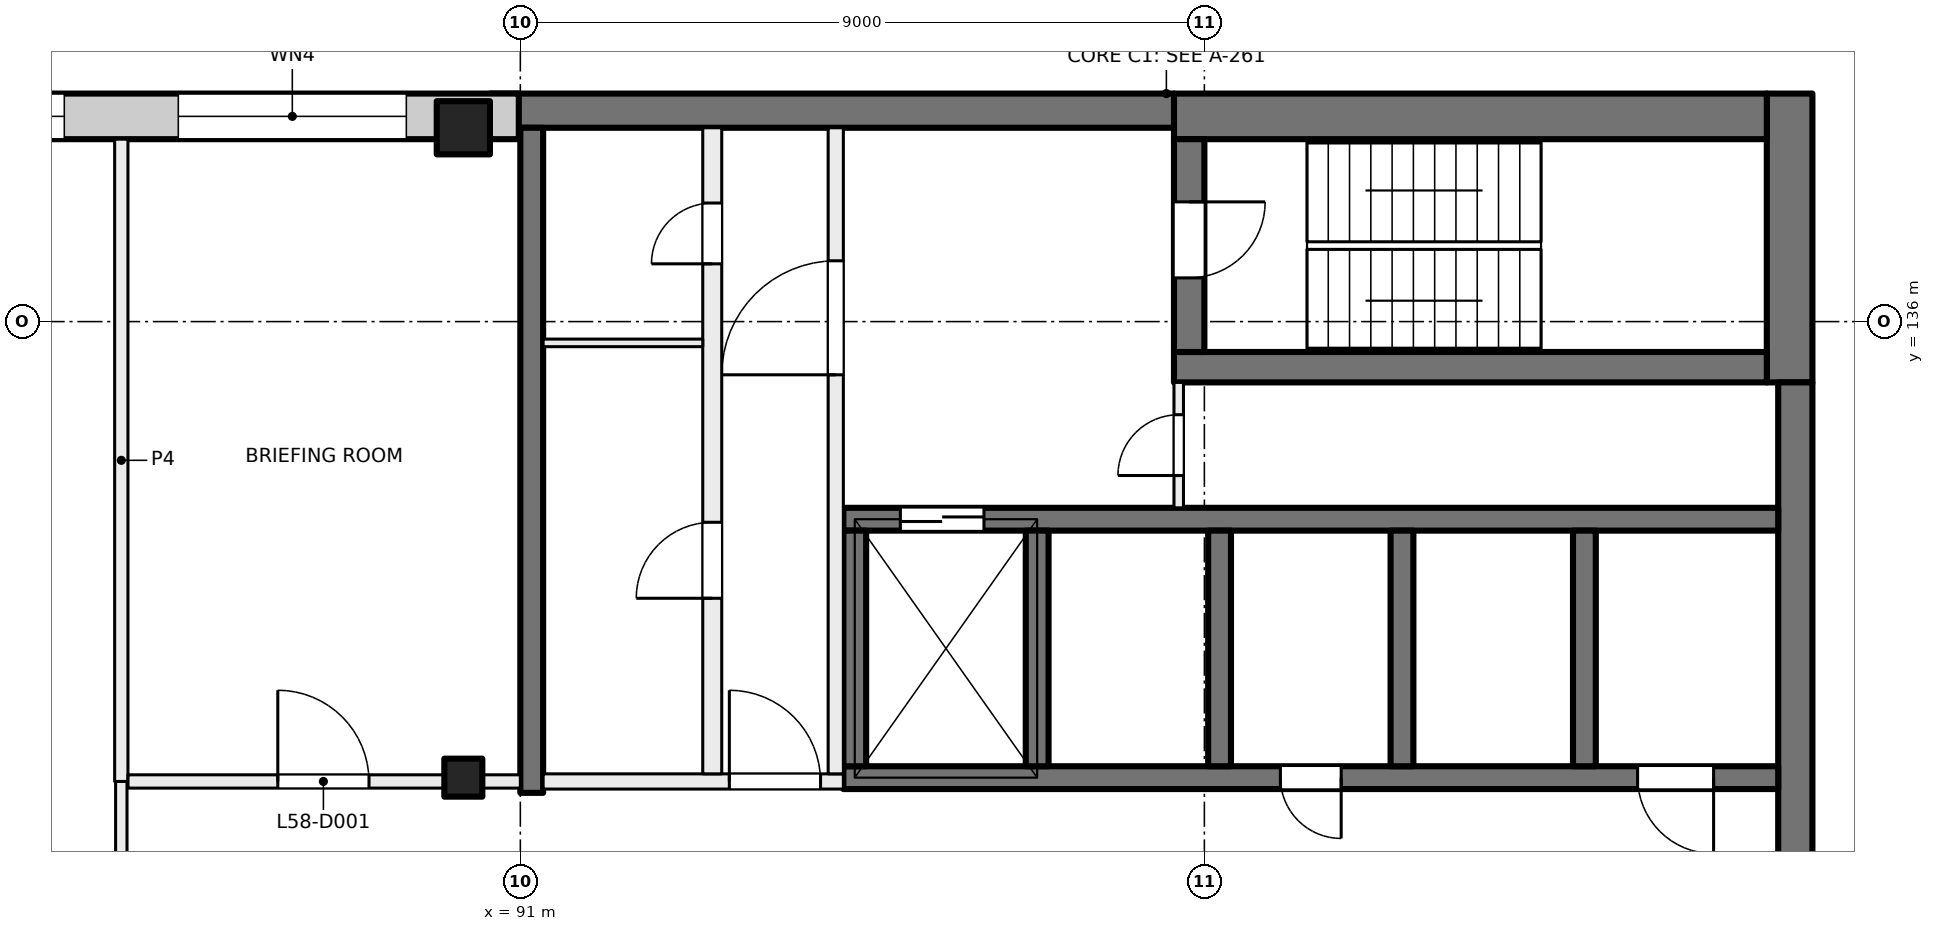
"""IFC4 building model, lengths in metres.
Left out: names, types, materials, properties, quantities, classifications, styles, units other than length and angle.
Written with IfcOpenShell. Run it as: python <this file> out.ifc"""

import sys

from ifc_helpers import new_model, si_unit, direction, frame, frame_2d, origin, origin_2d, place, context, subcontext, project, spatial, rectangle, extrude, element, fill, save


model = new_model("IFC4")
c1 = context("Model", 3, precision=1e-05, world=origin(), true_north=direction((0.0, 1.0)))
c2 = subcontext(c1, "Body", "Model", "MODEL_VIEW")
j1 = project(units=[si_unit("LENGTHUNIT", "METRE"), si_unit("PLANEANGLEUNIT", "RADIAN")], contexts=[c1])
p1 = place(None, origin())
s1 = spatial("IfcSite", under=j1, at=p1, CompositionType="ELEMENT")
p2 = place(p1, origin())
s2 = spatial("IfcBuilding", under=s1, at=p2, CompositionType="ELEMENT")
p3 = place(p2, frame((0.0, 0.0, 245.5)))
s3 = spatial("IfcBuildingStorey", under=s2, at=p3, CompositionType="ELEMENT", Elevation=245.5)
p4 = place(p3, frame((90.25, 130.0, 0.0), z_axis=(0.0, 0.0, 1.0), x_axis=(1.0, 0.0, 0.0)))
e1 = element("IfcColumn", 1, at=p4, inside=s3, PredefinedType="COLUMN", context=c2, shape_type="SweptSolid", body=[
    extrude(rectangle(XDim=0.5, YDim=0.5, at=origin_2d()), origin(), (0.0, 0.0, 1.0), 4.0),
])
p5 = place(p3, frame((90.25, 138.55, 0.0), z_axis=(0.0, 0.0, 1.0), x_axis=(1.0, 0.0, 0.0)))
e2 = element("IfcColumn", 2, at=p5, inside=s3, PredefinedType="COLUMN", context=c2, shape_type="SweptSolid", body=[
    extrude(rectangle(XDim=0.7, YDim=0.7, at=origin_2d()), origin(), (0.0, 0.0, 1.0), 4.0),
])
p6 = place(p3, frame((107.7, 139.0, 0.0), z_axis=(0.0, 0.0, 1.0), x_axis=(0.0, -1.0, 0.0)))
e3 = element("IfcWall", 3, at=p6, inside=s3, PredefinedType="SHEAR", context=c2, shape_type="SweptSolid", body=[
    extrude(rectangle(XDim=3.8, YDim=0.6, at=frame_2d((1.9, 0.0))), origin(), (0.0, 0.0, 1.0), 4.0),
])
p7 = place(p3, frame((107.775, 135.2, 0.0), z_axis=(0.0, 0.0, 1.0), x_axis=(0.0, -1.0, 0.0)))
e4 = element("IfcWall", 4, at=p7, inside=s3, PredefinedType="SHEAR", context=c2, shape_type="SweptSolid", body=[
    extrude(rectangle(XDim=14.4, YDim=0.45, at=frame_2d((7.2, 0.0))), origin(), (0.0, 0.0, 1.0), 4.0),
])
p8 = place(p3, frame((107.4, 138.7, 0.0), z_axis=(0.0, 0.0, 1.0), x_axis=(-1.0, 0.0, 0.0)))
e5 = element("IfcWall", 5, at=p8, inside=s3, PredefinedType="SHEAR", context=c2, shape_type="SweptSolid", body=[
    extrude(rectangle(XDim=7.8, YDim=0.6, at=frame_2d((3.9, 0.0))), origin(), (0.0, 0.0, 1.0), 4.0),
])
p9 = place(p3, frame((99.6, 138.775, 0.0), z_axis=(0.0, 0.0, 1.0), x_axis=(-1.0, 0.0, 0.0)))
e6 = element("IfcWall", 6, at=p9, inside=s3, PredefinedType="SHEAR", context=c2, shape_type="SweptSolid", body=[
    extrude(rectangle(XDim=9.0, YDim=0.45, at=frame_2d((4.5, 0.0))), origin(), (0.0, 0.0, 1.0), 4.0),
])
p10 = place(p3, frame((107.4, 135.4, 0.0), z_axis=(0.0, 0.0, 1.0), x_axis=(-1.0, 0.0, 0.0)))
e7 = element("IfcWall", 7, at=p10, inside=s3, PredefinedType="SHEAR", context=c2, shape_type="SweptSolid", body=[
    extrude(rectangle(XDim=7.8, YDim=0.4, at=frame_2d((3.9, 0.0))), origin(), (0.0, 0.0, 1.0), 4.0),
])
p11 = place(p3, frame((99.8, 138.4, 0.0), z_axis=(0.0, 0.0, 1.0), x_axis=(0.0, -1.0, 0.0)))
e8 = element("IfcWall", 8, at=p11, inside=s3, PredefinedType="SHEAR", context=c2, shape_type="SweptSolid", body=[
    extrude(rectangle(XDim=2.8, YDim=0.4, at=frame_2d((1.4, 0.0))), origin(), (0.0, 0.0, 1.0), 4.0),
])
p12 = place(p11, frame((0.825, 0.0, 0.0)))
e9 = element("IfcOpeningElement", 9, at=p12, cuts=e8, PredefinedType="OPENING", context=c2, shape_type="SweptSolid", body=[
    extrude(rectangle(XDim=1.0, YDim=2.1, at=frame_2d((0.5, 1.05))), frame((0.0, 0.21, 0.0), z_axis=(0.0, -1.0, 0.0), x_axis=(1.0, 0.0, 0.0)), (0.0, 0.0, 1.0), 0.42),
])
p13 = place(p3, frame((107.55, 130.0, 0.0), z_axis=(0.0, 0.0, 1.0), x_axis=(-1.0, 0.0, 0.0)))
e10 = element("IfcWall", 10, at=p13, inside=s3, PredefinedType="SHEAR", context=c2, shape_type="SweptSolid", body=[
    extrude(rectangle(XDim=12.3, YDim=0.3, at=frame_2d((6.15, 0.0))), origin(), (0.0, 0.0, 1.0), 4.0),
])
p14 = place(p13, frame((0.85, 0.0, 0.0)))
e11 = element("IfcOpeningElement", 11, at=p14, cuts=e10, PredefinedType="OPENING", context=c2, shape_type="SweptSolid", body=[
    extrude(rectangle(XDim=1.0, YDim=2.1, at=frame_2d((0.5, 1.05))), frame((0.0, 0.16, 0.0), z_axis=(0.0, -1.0, 0.0), x_axis=(1.0, 0.0, 0.0)), (0.0, 0.0, 1.0), 0.32),
])
p15 = place(p13, frame((5.75, 0.0, 0.0)))
e12 = element("IfcOpeningElement", 12, at=p15, cuts=e10, PredefinedType="OPENING", context=c2, shape_type="SweptSolid", body=[
    extrude(rectangle(XDim=0.8, YDim=2.1, at=frame_2d((0.4, 1.05))), frame((0.0, 0.16, 0.0), z_axis=(0.0, -1.0, 0.0), x_axis=(1.0, 0.0, 0.0)), (0.0, 0.0, 1.0), 0.32),
])
p16 = place(p3, frame((107.55, 133.4, 0.0), z_axis=(0.0, 0.0, 1.0), x_axis=(-1.0, 0.0, 0.0)))
e13 = element("IfcWall", 13, at=p16, inside=s3, PredefinedType="SHEAR", context=c2, shape_type="SweptSolid", body=[
    extrude(rectangle(XDim=12.3, YDim=0.3, at=frame_2d((6.15, 0.0))), origin(), (0.0, 0.0, 1.0), 4.0),
])
p17 = place(p16, frame((10.45, 0.0, 0.0)))
e14 = element("IfcOpeningElement", 14, at=p17, cuts=e13, PredefinedType="OPENING", context=c2, shape_type="SweptSolid", body=[
    extrude(rectangle(XDim=1.1, YDim=2.1, at=frame_2d((0.55, 1.05))), frame((0.0, 0.16, 0.0), z_axis=(0.0, -1.0, 0.0), x_axis=(1.0, 0.0, 0.0)), (0.0, 0.0, 1.0), 0.32),
])
for number, where, z_axis, x_axis in (
    (15, (105.0, 133.25, 0.0), (0.0, 0.0, 1.0), (0.0, -1.0, 0.0)),
    (16, (102.6, 133.25, 0.0), (0.0, 0.0, 1.0), (0.0, -1.0, 0.0)),
    (17, (100.2, 133.25, 0.0), (0.0, 0.0, 1.0), (0.0, -1.0, 0.0)),
    (18, (97.8, 133.25, 0.0), (0.0, 0.0, 1.0), (0.0, -1.0, 0.0)),
    (19, (95.4, 133.25, 0.0), (0.0, 0.0, 1.0), (0.0, -1.0, 0.0)),
):
    element("IfcWall", number, at=place(p3, frame(where, z_axis=z_axis, x_axis=x_axis)), inside=s3, PredefinedType="SHEAR", context=c2, shape_type="SweptSolid", body=[
        extrude(rectangle(XDim=3.1, YDim=0.3, at=frame_2d((1.55, 0.0))), origin(), (0.0, 0.0, 1.0), 4.0),
    ])
p18 = place(p3, frame((91.15, 138.55, 0.0), z_axis=(0.0, 0.0, 1.0), x_axis=(0.0, -1.0, 0.0)))
e20 = element("IfcWall", 20, at=p18, inside=s3, PredefinedType="SHEAR", context=c2, shape_type="SweptSolid", body=[
    extrude(rectangle(XDim=8.75, YDim=0.3, at=frame_2d((4.375, 0.0))), origin(), (0.0, 0.0, 1.0), 4.0),
])
p19 = place(p3, frame((47.07, 138.7, 0.0), z_axis=(0.0, 0.0, 1.0), x_axis=(1.0, 0.0, 0.0)))
e21 = element("IfcWall", 21, at=p19, inside=s3, PredefinedType="SOLIDWALL", context=c2, shape_type="SweptSolid", body=[
    extrude(rectangle(XDim=43.91, YDim=0.6, at=frame_2d((21.955, 0.0))), origin(), (0.0, 0.0, 1.0), 3.625),
])
p20 = place(p19, frame((3.43, 0.0, 0.9)))
e22 = element("IfcOpeningElement", 22, at=p20, cuts=e21, PredefinedType="OPENING", context=c2, shape_type="SweptSolid", body=[
    extrude(rectangle(XDim=3.0, YDim=2.4, at=frame_2d((1.5, 1.2))), frame((0.0, 0.31, 0.0), z_axis=(0.0, -1.0, 0.0), x_axis=(1.0, 0.0, 0.0)), (0.0, 0.0, 1.0), 0.62),
])
p21 = place(p19, frame((7.93, 0.0, 0.9)))
e23 = element("IfcOpeningElement", 23, at=p21, cuts=e21, PredefinedType="OPENING", context=c2, shape_type="SweptSolid", body=[
    extrude(rectangle(XDim=3.0, YDim=2.4, at=frame_2d((1.5, 1.2))), frame((0.0, 0.31, 0.0), z_axis=(0.0, -1.0, 0.0), x_axis=(1.0, 0.0, 0.0)), (0.0, 0.0, 1.0), 0.62),
])
p22 = place(p19, frame((12.43, 0.0, 0.9)))
e24 = element("IfcOpeningElement", 24, at=p22, cuts=e21, PredefinedType="OPENING", context=c2, shape_type="SweptSolid", body=[
    extrude(rectangle(XDim=3.0, YDim=2.4, at=frame_2d((1.5, 1.2))), frame((0.0, 0.31, 0.0), z_axis=(0.0, -1.0, 0.0), x_axis=(1.0, 0.0, 0.0)), (0.0, 0.0, 1.0), 0.62),
])
p23 = place(p19, frame((16.93, 0.0, 0.9)))
e25 = element("IfcOpeningElement", 25, at=p23, cuts=e21, PredefinedType="OPENING", context=c2, shape_type="SweptSolid", body=[
    extrude(rectangle(XDim=3.0, YDim=2.4, at=frame_2d((1.5, 1.2))), frame((0.0, 0.31, 0.0), z_axis=(0.0, -1.0, 0.0), x_axis=(1.0, 0.0, 0.0)), (0.0, 0.0, 1.0), 0.62),
])
p24 = place(p19, frame((21.43, 0.0, 0.9)))
e26 = element("IfcOpeningElement", 26, at=p24, cuts=e21, PredefinedType="OPENING", context=c2, shape_type="SweptSolid", body=[
    extrude(rectangle(XDim=3.0, YDim=2.4, at=frame_2d((1.5, 1.2))), frame((0.0, 0.31, 0.0), z_axis=(0.0, -1.0, 0.0), x_axis=(1.0, 0.0, 0.0)), (0.0, 0.0, 1.0), 0.62),
])
p25 = place(p19, frame((25.93, 0.0, 0.9)))
e27 = element("IfcOpeningElement", 27, at=p25, cuts=e21, PredefinedType="OPENING", context=c2, shape_type="SweptSolid", body=[
    extrude(rectangle(XDim=3.0, YDim=2.4, at=frame_2d((1.5, 1.2))), frame((0.0, 0.31, 0.0), z_axis=(0.0, -1.0, 0.0), x_axis=(1.0, 0.0, 0.0)), (0.0, 0.0, 1.0), 0.62),
])
p26 = place(p19, frame((30.43, 0.0, 0.9)))
e28 = element("IfcOpeningElement", 28, at=p26, cuts=e21, PredefinedType="OPENING", context=c2, shape_type="SweptSolid", body=[
    extrude(rectangle(XDim=3.0, YDim=2.4, at=frame_2d((1.5, 1.2))), frame((0.0, 0.31, 0.0), z_axis=(0.0, -1.0, 0.0), x_axis=(1.0, 0.0, 0.0)), (0.0, 0.0, 1.0), 0.62),
])
p27 = place(p19, frame((34.93, 0.0, 0.9)))
e29 = element("IfcOpeningElement", 29, at=p27, cuts=e21, PredefinedType="OPENING", context=c2, shape_type="SweptSolid", body=[
    extrude(rectangle(XDim=3.0, YDim=2.4, at=frame_2d((1.5, 1.2))), frame((0.0, 0.31, 0.0), z_axis=(0.0, -1.0, 0.0), x_axis=(1.0, 0.0, 0.0)), (0.0, 0.0, 1.0), 0.62),
])
p28 = place(p19, frame((39.43, 0.0, 0.9)))
e30 = element("IfcOpeningElement", 30, at=p28, cuts=e21, PredefinedType="OPENING", context=c2, shape_type="SweptSolid", body=[
    extrude(rectangle(XDim=3.0, YDim=2.4, at=frame_2d((1.5, 1.2))), frame((0.0, 0.31, 0.0), z_axis=(0.0, -1.0, 0.0), x_axis=(1.0, 0.0, 0.0)), (0.0, 0.0, 1.0), 0.62),
])
p29 = place(p3, frame((91.3, 129.95, 0.0), z_axis=(0.0, 0.0, 1.0), x_axis=(1.0, 0.0, 0.0)))
e31 = element("IfcWall", 31, at=p29, inside=s3, PredefinedType="PARTITIONING", context=c2, shape_type="SweptSolid", body=[
    extrude(rectangle(XDim=3.95, YDim=0.2, at=frame_2d((1.975, 0.0))), origin(), (0.0, 0.0, 1.0), 3.625),
])
p30 = place(p29, frame((2.45, 0.0, 0.0)))
e32 = element("IfcOpeningElement", 32, at=p30, cuts=e31, PredefinedType="OPENING", context=c2, shape_type="SweptSolid", body=[
    extrude(rectangle(XDim=1.2, YDim=2.1, at=frame_2d((0.6, 1.05))), frame((0.0, 0.11, 0.0), z_axis=(0.0, -1.0, 0.0), x_axis=(1.0, 0.0, 0.0)), (0.0, 0.0, 1.0), 0.22),
])
p31 = place(p3, frame((95.15, 130.05, 0.0), z_axis=(0.0, 0.0, 1.0), x_axis=(0.0, 1.0, 0.0)))
e33 = element("IfcWall", 33, at=p31, inside=s3, PredefinedType="PARTITIONING", context=c2, shape_type="SweptSolid", body=[
    extrude(rectangle(XDim=8.5, YDim=0.2, at=frame_2d((4.25, 0.0))), origin(), (0.0, 0.0, 1.0), 3.625),
])
p32 = place(p31, frame((5.25, 0.0, 0.0)))
e34 = element("IfcOpeningElement", 34, at=p32, cuts=e33, PredefinedType="OPENING", context=c2, shape_type="SweptSolid", body=[
    extrude(rectangle(XDim=1.5, YDim=2.1, at=frame_2d((0.75, 1.05))), frame((0.0, 0.11, 0.0), z_axis=(0.0, -1.0, 0.0), x_axis=(1.0, 0.0, 0.0)), (0.0, 0.0, 1.0), 0.22),
])
p33 = place(p3, frame((93.525, 130.05, 0.0), z_axis=(0.0, 0.0, 1.0), x_axis=(0.0, 1.0, 0.0)))
e35 = element("IfcWall", 35, at=p33, inside=s3, PredefinedType="PARTITIONING", context=c2, shape_type="SweptSolid", body=[
    extrude(rectangle(XDim=8.5, YDim=0.25, at=frame_2d((4.25, 0.0))), origin(), (0.0, 0.0, 1.0), 3.625),
])
p34 = place(p33, frame((2.31, 0.0, 0.0)))
e36 = element("IfcOpeningElement", 36, at=p34, cuts=e35, PredefinedType="OPENING", context=c2, shape_type="SweptSolid", body=[
    extrude(rectangle(XDim=1.0, YDim=2.1, at=frame_2d((0.5, 1.05))), frame((0.0, 0.135, 0.0), z_axis=(0.0, -1.0, 0.0), x_axis=(1.0, 0.0, 0.0)), (0.0, 0.0, 1.0), 0.27),
])
p35 = place(p33, frame((6.71, 0.0, 0.0)))
e37 = element("IfcOpeningElement", 37, at=p35, cuts=e35, PredefinedType="OPENING", context=c2, shape_type="SweptSolid", body=[
    extrude(rectangle(XDim=0.8, YDim=2.1, at=frame_2d((0.4, 1.05))), frame((0.0, 0.135, 0.0), z_axis=(0.0, -1.0, 0.0), x_axis=(1.0, 0.0, 0.0)), (0.0, 0.0, 1.0), 0.27),
])
p36 = place(p3, frame((99.663, 133.55, 0.0), z_axis=(0.0, 0.0, 1.0), x_axis=(0.0, 1.0, 0.0)))
e38 = element("IfcWall", 38, at=p36, inside=s3, PredefinedType="PARTITIONING", context=c2, shape_type="SweptSolid", body=[
    extrude(rectangle(XDim=1.65, YDim=0.125, at=frame_2d((0.825, 0.0))), origin(), (0.0, 0.0, 1.0), 3.625),
])
p37 = place(p36, frame((0.425, 0.0, 0.0)))
e39 = element("IfcOpeningElement", 39, at=p37, cuts=e38, PredefinedType="OPENING", context=c2, shape_type="SweptSolid", body=[
    extrude(rectangle(XDim=0.8, YDim=2.1, at=frame_2d((0.4, 1.05))), frame((0.0, 0.073, 0.0), z_axis=(0.0, -1.0, 0.0), x_axis=(1.0, 0.0, 0.0)), (0.0, 0.0, 1.0), 0.145),
])
p38 = place(p3, frame((91.3, 135.72, 0.0), z_axis=(0.0, 0.0, 1.0), x_axis=(1.0, 0.0, 0.0)))
e40 = element("IfcWall", 40, at=p38, inside=s3, PredefinedType="PARTITIONING", context=c2, shape_type="SweptSolid", body=[
    extrude(rectangle(XDim=2.1, YDim=0.1, at=frame_2d((1.05, 0.0))), origin(), (0.0, 0.0, 1.0), 3.625),
])
p39 = place(p3, frame((85.75, 121.5, 0.0), z_axis=(0.0, 0.0, 1.0), x_axis=(0.0, 1.0, 0.0)))
e41 = element("IfcWall", 41, at=p39, inside=s3, PredefinedType="PARTITIONING", context=c2, shape_type="SweptSolid", body=[
    extrude(rectangle(XDim=8.45, YDim=0.15, at=frame_2d((4.225, 0.0))), origin(), (0.0, 0.0, 1.0), 3.625),
])
p40 = place(p3, frame((85.75, 129.95, 0.0), z_axis=(0.0, 0.0, 1.0), x_axis=(0.0, 1.0, 0.0)))
e42 = element("IfcWall", 42, at=p40, inside=s3, PredefinedType="PARTITIONING", context=c2, shape_type="SweptSolid", body=[
    extrude(rectangle(XDim=8.45, YDim=0.175, at=frame_2d((4.225, 0.0))), origin(), (0.0, 0.0, 1.0), 3.625),
])
p41 = place(p3, frame((85.838, 129.95, 0.0), z_axis=(0.0, 0.0, 1.0), x_axis=(1.0, 0.0, 0.0)))
e43 = element("IfcWall", 43, at=p41, inside=s3, PredefinedType="PARTITIONING", context=c2, shape_type="SweptSolid", body=[
    extrude(rectangle(XDim=5.162, YDim=0.175, at=frame_2d((2.581, 0.0))), origin(), (0.0, 0.0, 1.0), 3.625),
])
p42 = place(p41, frame((1.971, 0.0, 0.0)))
e44 = element("IfcOpeningElement", 44, at=p42, cuts=e43, PredefinedType="OPENING", context=c2, shape_type="SweptSolid", body=[
    extrude(rectangle(XDim=1.2, YDim=2.1, at=frame_2d((0.6, 1.05))), frame((0.0, 0.097, 0.0), z_axis=(0.0, -1.0, 0.0), x_axis=(1.0, 0.0, 0.0)), (0.0, 0.0, 1.0), 0.195),
])
p43 = place(p27, origin())
e45 = element("IfcWindow", 45, at=p43, inside=s3, PartitioningType="SINGLE_PANEL", PredefinedType="WINDOW", context=c2, shape_type="SweptSolid", body=[
    extrude(rectangle(XDim=3.0, YDim=2.4, at=frame_2d((1.5, 1.2))), frame((0.0, 0.03, 0.0), z_axis=(0.0, -1.0, 0.0), x_axis=(1.0, 0.0, 0.0)), (0.0, 0.0, 1.0), 0.06),
])
fill(e29, e45)
p44 = place(p28, origin())
e46 = element("IfcWindow", 46, at=p44, inside=s3, PartitioningType="SINGLE_PANEL", PredefinedType="WINDOW", context=c2, shape_type="SweptSolid", body=[
    extrude(rectangle(XDim=3.0, YDim=2.4, at=frame_2d((1.5, 1.2))), frame((0.0, 0.03, 0.0), z_axis=(0.0, -1.0, 0.0), x_axis=(1.0, 0.0, 0.0)), (0.0, 0.0, 1.0), 0.06),
])
fill(e30, e46)
p45 = place(p14, origin())
e47 = element("IfcDoor", 47, at=p45, inside=s3, OperationType="SINGLE_SWING_LEFT", PredefinedType="DOOR", context=c2, shape_type="SweptSolid", body=[
    extrude(rectangle(XDim=1.0, YDim=2.1, at=frame_2d((0.5, 1.05))), frame((0.0, 0.025, 0.0), z_axis=(0.0, -1.0, 0.0), x_axis=(1.0, 0.0, 0.0)), (0.0, 0.0, 1.0), 0.05),
])
fill(e11, e47)
p46 = place(p15, origin())
e48 = element("IfcDoor", 48, at=p46, inside=s3, OperationType="SINGLE_SWING_RIGHT", PredefinedType="DOOR", context=c2, shape_type="SweptSolid", body=[
    extrude(rectangle(XDim=0.8, YDim=2.1, at=frame_2d((0.4, 1.05))), frame((0.0, 0.025, 0.0), z_axis=(0.0, -1.0, 0.0), x_axis=(1.0, 0.0, 0.0)), (0.0, 0.0, 1.0), 0.05),
])
fill(e12, e48)
p47 = place(p30, origin())
e49 = element("IfcDoor", 49, at=p47, inside=s3, OperationType="DOUBLE_DOOR_SINGLE_SWING", PredefinedType="DOOR", context=c2, shape_type="SweptSolid", body=[
    extrude(rectangle(XDim=1.2, YDim=2.1, at=frame_2d((0.6, 1.05))), frame((0.0, 0.025, 0.0), z_axis=(0.0, -1.0, 0.0), x_axis=(1.0, 0.0, 0.0)), (0.0, 0.0, 1.0), 0.05),
])
fill(e32, e49)
p48 = place(p32, origin())
e50 = element("IfcDoor", 50, at=p48, inside=s3, OperationType="DOUBLE_DOOR_SINGLE_SWING", PredefinedType="DOOR", context=c2, shape_type="SweptSolid", body=[
    extrude(rectangle(XDim=1.5, YDim=2.1, at=frame_2d((0.75, 1.05))), frame((0.0, 0.025, 0.0), z_axis=(0.0, -1.0, 0.0), x_axis=(1.0, 0.0, 0.0)), (0.0, 0.0, 1.0), 0.05),
])
fill(e34, e50)
p49 = place(p12, origin())
e51 = element("IfcDoor", 51, at=p49, inside=s3, OperationType="SINGLE_SWING_RIGHT", PredefinedType="DOOR", context=c2, shape_type="SweptSolid", body=[
    extrude(rectangle(XDim=1.0, YDim=2.1, at=frame_2d((0.5, 1.05))), frame((0.0, 0.025, 0.0), z_axis=(0.0, -1.0, 0.0), x_axis=(1.0, 0.0, 0.0)), (0.0, 0.0, 1.0), 0.05),
])
fill(e9, e51)
p50 = place(p37, origin())
e52 = element("IfcDoor", 52, at=p50, inside=s3, OperationType="SINGLE_SWING_LEFT", PredefinedType="DOOR", context=c2, shape_type="SweptSolid", body=[
    extrude(rectangle(XDim=0.8, YDim=2.1, at=frame_2d((0.4, 1.05))), frame((0.0, 0.025, 0.0), z_axis=(0.0, -1.0, 0.0), x_axis=(1.0, 0.0, 0.0)), (0.0, 0.0, 1.0), 0.05),
])
fill(e39, e52)
p51 = place(p34, origin())
e53 = element("IfcDoor", 53, at=p51, inside=s3, OperationType="SINGLE_SWING_RIGHT", PredefinedType="DOOR", context=c2, shape_type="SweptSolid", body=[
    extrude(rectangle(XDim=1.0, YDim=2.1, at=frame_2d((0.5, 1.05))), frame((0.0, 0.025, 0.0), z_axis=(0.0, -1.0, 0.0), x_axis=(1.0, 0.0, 0.0)), (0.0, 0.0, 1.0), 0.05),
])
fill(e36, e53)
p52 = place(p35, origin())
e54 = element("IfcDoor", 54, at=p52, inside=s3, OperationType="SINGLE_SWING_LEFT", PredefinedType="DOOR", context=c2, shape_type="SweptSolid", body=[
    extrude(rectangle(XDim=0.8, YDim=2.1, at=frame_2d((0.4, 1.05))), frame((0.0, 0.025, 0.0), z_axis=(0.0, -1.0, 0.0), x_axis=(1.0, 0.0, 0.0)), (0.0, 0.0, 1.0), 0.05),
])
fill(e37, e54)
p53 = place(p17, origin())
e55 = element("IfcDoor", 55, at=p53, inside=s3, OperationType="DOUBLE_DOOR_SLIDING", PredefinedType="DOOR", context=c2, shape_type="SweptSolid", body=[
    extrude(rectangle(XDim=1.1, YDim=2.1, at=frame_2d((0.55, 1.05))), frame((0.0, 0.025, 0.0), z_axis=(0.0, -1.0, 0.0), x_axis=(1.0, 0.0, 0.0)), (0.0, 0.0, 1.0), 0.05),
])
fill(e14, e55)
p54 = place(p42, origin())
e56 = element("IfcDoor", 56, at=p54, inside=s3, OperationType="DOUBLE_DOOR_SINGLE_SWING", PredefinedType="DOOR", context=c2, shape_type="SweptSolid", body=[
    extrude(rectangle(XDim=1.2, YDim=2.1, at=frame_2d((0.6, 1.05))), frame((0.0, 0.025, 0.0), z_axis=(0.0, -1.0, 0.0), x_axis=(1.0, 0.0, 0.0)), (0.0, 0.0, 1.0), 0.05),
])
fill(e44, e56)
save(model, sys.argv[1])
